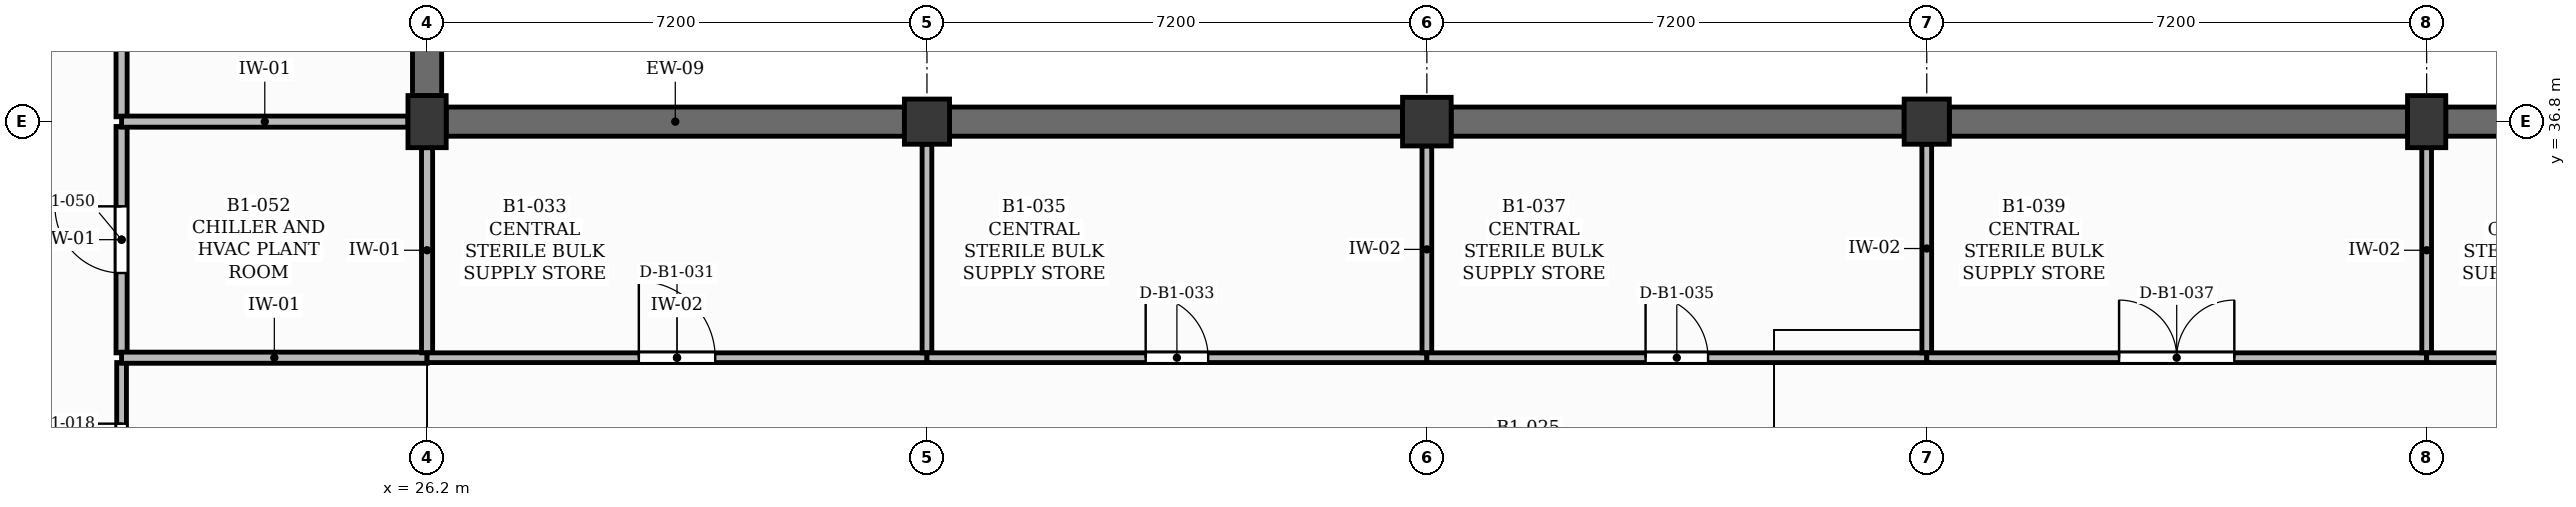
"""IFC4 building model, lengths in metres.
Left out: names, types, materials, properties, quantities, classifications, styles, units other than length and angle.
Written with IfcOpenShell. Run it as: python <this file> out.ifc"""

import sys

from ifc_helpers import new_model, si_unit, direction, frame, frame_2d, origin, origin_2d, place, context, subcontext, project, spatial, rectangle, extrude, element, fill, save


model = new_model("IFC4")
c1 = context("Model", 3, precision=1e-05, world=origin(), true_north=direction((0.0, 1.0)))
c2 = subcontext(c1, "Body", "Model", "MODEL_VIEW")
j1 = project(units=[si_unit("LENGTHUNIT", "METRE"), si_unit("PLANEANGLEUNIT", "RADIAN")], contexts=[c1])
p1 = place(None, origin())
s1 = spatial("IfcSite", under=j1, at=p1, CompositionType="ELEMENT")
p2 = place(p1, origin())
s2 = spatial("IfcBuilding", under=s1, at=p2, CompositionType="ELEMENT")
p3 = place(p2, frame((0.0, 0.0, -4.5)))
s3 = spatial("IfcBuildingStorey", under=s2, at=p3, CompositionType="ELEMENT", Elevation=-4.5)
p4 = place(p3, frame((26.2, 36.8, 0.0), z_axis=(0.0, 0.0, 1.0), x_axis=(1.0, 0.0, 0.0)))
e1 = element("IfcColumn", 1, at=p4, inside=s3, PredefinedType="COLUMN", context=c2, shape_type="SweptSolid", body=[
    extrude(rectangle(XDim=0.55, YDim=0.75, at=origin_2d()), origin(), (0.0, 0.0, 1.0), 4.2),
])
p5 = place(p3, frame((33.4, 36.8, 0.0), z_axis=(0.0, 0.0, 1.0), x_axis=(1.0, 0.0, 0.0)))
e2 = element("IfcColumn", 2, at=p5, inside=s3, PredefinedType="COLUMN", context=c2, shape_type="SweptSolid", body=[
    extrude(rectangle(XDim=0.65, YDim=0.65, at=origin_2d()), origin(), (0.0, 0.0, 1.0), 4.2),
])
p6 = place(p3, frame((40.6, 36.8, 0.0), z_axis=(0.0, 0.0, 1.0), x_axis=(1.0, 0.0, 0.0)))
e3 = element("IfcColumn", 3, at=p6, inside=s3, PredefinedType="COLUMN", context=c2, shape_type="SweptSolid", body=[
    extrude(rectangle(XDim=0.7, YDim=0.7, at=origin_2d()), origin(), (0.0, 0.0, 1.0), 4.2),
])
p7 = place(p3, frame((47.8, 36.8, 0.0), z_axis=(0.0, 0.0, 1.0), x_axis=(1.0, 0.0, 0.0)))
e4 = element("IfcColumn", 4, at=p7, inside=s3, PredefinedType="COLUMN", context=c2, shape_type="SweptSolid", body=[
    extrude(rectangle(XDim=0.65, YDim=0.65, at=origin_2d()), origin(), (0.0, 0.0, 1.0), 4.2),
])
p8 = place(p3, frame((55.0, 36.8, 0.0), z_axis=(0.0, 0.0, 1.0), x_axis=(1.0, 0.0, 0.0)))
e5 = element("IfcColumn", 5, at=p8, inside=s3, PredefinedType="COLUMN", context=c2, shape_type="SweptSolid", body=[
    extrude(rectangle(XDim=0.55, YDim=0.75, at=origin_2d()), origin(), (0.0, 0.0, 1.0), 4.2),
])
p9 = place(p3, frame((26.2, 37.175, 0.0), z_axis=(0.0, 0.0, 1.0), x_axis=(0.0, 1.0, 0.0)))
e6 = element("IfcWall", 6, at=p9, inside=s3, PredefinedType="USERDEFINED", context=c2, shape_type="SweptSolid", body=[
    extrude(rectangle(XDim=7.85, YDim=0.42, at=frame_2d((3.925, 0.0))), origin(), (0.0, 0.0, 1.0), 4.2),
])
p10 = place(p3, frame((26.475, 36.8, 0.0), z_axis=(0.0, 0.0, 1.0), x_axis=(1.0, 0.0, 0.0)))
e7 = element("IfcWall", 7, at=p10, inside=s3, PredefinedType="USERDEFINED", context=c2, shape_type="SweptSolid", body=[
    extrude(rectangle(XDim=6.6, YDim=0.42, at=frame_2d((3.3, 0.0))), origin(), (0.0, 0.0, 1.0), 4.2),
])
p11 = place(p3, frame((33.725, 36.8, 0.0), z_axis=(0.0, 0.0, 1.0), x_axis=(1.0, 0.0, 0.0)))
e8 = element("IfcWall", 8, at=p11, inside=s3, PredefinedType="USERDEFINED", context=c2, shape_type="SweptSolid", body=[
    extrude(rectangle(XDim=6.525, YDim=0.42, at=frame_2d((3.262, 0.0))), origin(), (0.0, 0.0, 1.0), 4.2),
])
p12 = place(p3, frame((40.95, 36.8, 0.0), z_axis=(0.0, 0.0, 1.0), x_axis=(1.0, 0.0, 0.0)))
e9 = element("IfcWall", 9, at=p12, inside=s3, PredefinedType="USERDEFINED", context=c2, shape_type="SweptSolid", body=[
    extrude(rectangle(XDim=6.525, YDim=0.42, at=frame_2d((3.263, 0.0))), origin(), (0.0, 0.0, 1.0), 4.2),
])
p13 = place(p3, frame((48.125, 36.8, 0.0), z_axis=(0.0, 0.0, 1.0), x_axis=(1.0, 0.0, 0.0)))
e10 = element("IfcWall", 10, at=p13, inside=s3, PredefinedType="USERDEFINED", context=c2, shape_type="SweptSolid", body=[
    extrude(rectangle(XDim=6.6, YDim=0.42, at=frame_2d((3.3, 0.0))), origin(), (0.0, 0.0, 1.0), 4.2),
])
p14 = place(p3, frame((55.275, 36.8, 0.0), z_axis=(0.0, 0.0, 1.0), x_axis=(1.0, 0.0, 0.0)))
e11 = element("IfcWall", 11, at=p14, inside=s3, PredefinedType="USERDEFINED", context=c2, shape_type="SweptSolid", body=[
    extrude(rectangle(XDim=6.575, YDim=0.42, at=frame_2d((3.288, 0.0))), origin(), (0.0, 0.0, 1.0), 4.2),
])
p15 = place(p3, frame((21.8, 30.47, 0.0), z_axis=(0.0, 0.0, 1.0), x_axis=(0.0, 1.0, 0.0)))
e12 = element("IfcWall", 12, at=p15, inside=s3, PredefinedType="PARTITIONING", context=c2, shape_type="SweptSolid", body=[
    extrude(rectangle(XDim=2.86, YDim=0.14, at=frame_2d((1.43, 0.0))), origin(), (0.0, 0.0, 1.0), 4.08),
])
p16 = place(p15, frame((0.88, 0.0, 0.0)))
e13 = element("IfcOpeningElement", 13, at=p16, cuts=e12, PredefinedType="OPENING", context=c2, shape_type="SweptSolid", body=[
    extrude(rectangle(XDim=1.1, YDim=2.1, at=frame_2d((0.55, 1.05))), frame((0.0, 0.08, 0.0), z_axis=(0.0, -1.0, 0.0), x_axis=(1.0, 0.0, 0.0)), (0.0, 0.0, 1.0), 0.16),
])
p17 = place(p3, frame((21.8, 33.47, 0.0), z_axis=(0.0, 0.0, 1.0), x_axis=(0.0, 1.0, 0.0)))
e14 = element("IfcWall", 14, at=p17, inside=s3, PredefinedType="PARTITIONING", context=c2, shape_type="SweptSolid", body=[
    extrude(rectangle(XDim=3.26, YDim=0.16, at=frame_2d((1.63, 0.0))), origin(), (0.0, 0.0, 1.0), 4.08),
])
p18 = place(p17, frame((1.15, 0.0, 0.0)))
e15 = element("IfcOpeningElement", 15, at=p18, cuts=e14, PredefinedType="OPENING", context=c2, shape_type="SweptSolid", body=[
    extrude(rectangle(XDim=0.96, YDim=2.1, at=frame_2d((0.48, 1.05))), frame((0.0, 0.09, 0.0), z_axis=(0.0, -1.0, 0.0), x_axis=(1.0, 0.0, 0.0)), (0.0, 0.0, 1.0), 0.18),
])
p19 = place(p3, frame((21.8, 33.4, 0.0), z_axis=(0.0, 0.0, 1.0), x_axis=(1.0, 0.0, 0.0)))
e16 = element("IfcWall", 16, at=p19, inside=s3, PredefinedType="PARTITIONING", context=c2, shape_type="SweptSolid", body=[
    extrude(rectangle(XDim=4.4, YDim=0.16, at=frame_2d((2.2, 0.0))), origin(), (0.0, 0.0, 1.0), 4.08),
])
p20 = place(p3, frame((21.8, 36.87, 0.0), z_axis=(0.0, 0.0, 1.0), x_axis=(0.0, 1.0, 0.0)))
e17 = element("IfcWall", 17, at=p20, inside=s3, PredefinedType="PARTITIONING", context=c2, shape_type="SweptSolid", body=[
    extrude(rectangle(XDim=8.46, YDim=0.16, at=frame_2d((4.23, 0.0))), origin(), (0.0, 0.0, 1.0), 4.08),
])
p21 = place(p20, frame((3.75, 0.0, 0.0)))
e18 = element("IfcOpeningElement", 18, at=p21, cuts=e17, PredefinedType="OPENING", context=c2, shape_type="SweptSolid", body=[
    extrude(rectangle(XDim=0.96, YDim=2.1, at=frame_2d((0.48, 1.05))), frame((0.0, 0.09, 0.0), z_axis=(0.0, -1.0, 0.0), x_axis=(1.0, 0.0, 0.0)), (0.0, 0.0, 1.0), 0.18),
])
p22 = place(p3, frame((21.8, 36.8, 0.0), z_axis=(0.0, 0.0, 1.0), x_axis=(1.0, 0.0, 0.0)))
e19 = element("IfcWall", 19, at=p22, inside=s3, PredefinedType="PARTITIONING", context=c2, shape_type="SweptSolid", body=[
    extrude(rectangle(XDim=4.125, YDim=0.16, at=frame_2d((2.062, 0.0))), origin(), (0.0, 0.0, 1.0), 3.5),
])
p23 = place(p3, frame((26.2, 33.47, 0.0), z_axis=(0.0, 0.0, 1.0), x_axis=(0.0, 1.0, 0.0)))
e20 = element("IfcWall", 20, at=p23, inside=s3, PredefinedType="PARTITIONING", context=c2, shape_type="SweptSolid", body=[
    extrude(rectangle(XDim=2.955, YDim=0.16, at=frame_2d((1.478, 0.0))), origin(), (0.0, 0.0, 1.0), 3.4),
])
p24 = place(p3, frame((26.2, 33.4, 0.0), z_axis=(0.0, 0.0, 1.0), x_axis=(1.0, 0.0, 0.0)))
e21 = element("IfcWall", 21, at=p24, inside=s3, PredefinedType="PARTITIONING", context=c2, shape_type="SweptSolid", body=[
    extrude(rectangle(XDim=7.2, YDim=0.14, at=frame_2d((3.6, 0.0))), origin(), (0.0, 0.0, 1.0), 4.08),
])
p25 = place(p24, frame((3.05, 0.0, 0.0)))
e22 = element("IfcOpeningElement", 22, at=p25, cuts=e21, PredefinedType="OPENING", context=c2, shape_type="SweptSolid", body=[
    extrude(rectangle(XDim=1.1, YDim=2.1, at=frame_2d((0.55, 1.05))), frame((0.0, 0.08, 0.0), z_axis=(0.0, -1.0, 0.0), x_axis=(1.0, 0.0, 0.0)), (0.0, 0.0, 1.0), 0.16),
])
p26 = place(p3, frame((33.4, 33.47, 0.0), z_axis=(0.0, 0.0, 1.0), x_axis=(0.0, 1.0, 0.0)))
e23 = element("IfcWall", 23, at=p26, inside=s3, PredefinedType="PARTITIONING", context=c2, shape_type="SweptSolid", body=[
    extrude(rectangle(XDim=3.005, YDim=0.14, at=frame_2d((1.502, 0.0))), origin(), (0.0, 0.0, 1.0), 3.4),
])
p27 = place(p3, frame((33.4, 33.4, 0.0), z_axis=(0.0, 0.0, 1.0), x_axis=(1.0, 0.0, 0.0)))
e24 = element("IfcWall", 24, at=p27, inside=s3, PredefinedType="PARTITIONING", context=c2, shape_type="SweptSolid", body=[
    extrude(rectangle(XDim=7.2, YDim=0.14, at=frame_2d((3.6, 0.0))), origin(), (0.0, 0.0, 1.0), 4.08),
])
p28 = place(p27, frame((3.15, 0.0, 0.0)))
e25 = element("IfcOpeningElement", 25, at=p28, cuts=e24, PredefinedType="OPENING", context=c2, shape_type="SweptSolid", body=[
    extrude(rectangle(XDim=0.9, YDim=2.1, at=frame_2d((0.45, 1.05))), frame((0.0, 0.08, 0.0), z_axis=(0.0, -1.0, 0.0), x_axis=(1.0, 0.0, 0.0)), (0.0, 0.0, 1.0), 0.16),
])
p29 = place(p3, frame((40.6, 33.47, 0.0), z_axis=(0.0, 0.0, 1.0), x_axis=(0.0, 1.0, 0.0)))
e26 = element("IfcWall", 26, at=p29, inside=s3, PredefinedType="PARTITIONING", context=c2, shape_type="SweptSolid", body=[
    extrude(rectangle(XDim=2.98, YDim=0.14, at=frame_2d((1.49, 0.0))), origin(), (0.0, 0.0, 1.0), 3.4),
])
p30 = place(p3, frame((40.6, 33.4, 0.0), z_axis=(0.0, 0.0, 1.0), x_axis=(1.0, 0.0, 0.0)))
e27 = element("IfcWall", 27, at=p30, inside=s3, PredefinedType="PARTITIONING", context=c2, shape_type="SweptSolid", body=[
    extrude(rectangle(XDim=7.2, YDim=0.14, at=frame_2d((3.6, 0.0))), origin(), (0.0, 0.0, 1.0), 4.08),
])
p31 = place(p30, frame((3.15, 0.0, 0.0)))
e28 = element("IfcOpeningElement", 28, at=p31, cuts=e27, PredefinedType="OPENING", context=c2, shape_type="SweptSolid", body=[
    extrude(rectangle(XDim=0.9, YDim=2.1, at=frame_2d((0.45, 1.05))), frame((0.0, 0.08, 0.0), z_axis=(0.0, -1.0, 0.0), x_axis=(1.0, 0.0, 0.0)), (0.0, 0.0, 1.0), 0.16),
])
p32 = place(p3, frame((47.8, 33.47, 0.0), z_axis=(0.0, 0.0, 1.0), x_axis=(0.0, 1.0, 0.0)))
e29 = element("IfcWall", 29, at=p32, inside=s3, PredefinedType="PARTITIONING", context=c2, shape_type="SweptSolid", body=[
    extrude(rectangle(XDim=3.005, YDim=0.14, at=frame_2d((1.502, 0.0))), origin(), (0.0, 0.0, 1.0), 3.4),
])
p33 = place(p3, frame((47.8, 33.4, 0.0), z_axis=(0.0, 0.0, 1.0), x_axis=(1.0, 0.0, 0.0)))
e30 = element("IfcWall", 30, at=p33, inside=s3, PredefinedType="PARTITIONING", context=c2, shape_type="SweptSolid", body=[
    extrude(rectangle(XDim=7.2, YDim=0.14, at=frame_2d((3.6, 0.0))), origin(), (0.0, 0.0, 1.0), 4.08),
])
p34 = place(p33, frame((2.77, 0.0, 0.0)))
e31 = element("IfcOpeningElement", 31, at=p34, cuts=e30, PredefinedType="OPENING", context=c2, shape_type="SweptSolid", body=[
    extrude(rectangle(XDim=1.66, YDim=2.3, at=frame_2d((0.83, 1.15))), frame((0.0, 0.08, 0.0), z_axis=(0.0, -1.0, 0.0), x_axis=(1.0, 0.0, 0.0)), (0.0, 0.0, 1.0), 0.16),
])
p35 = place(p3, frame((55.0, 33.47, 0.0), z_axis=(0.0, 0.0, 1.0), x_axis=(0.0, 1.0, 0.0)))
e32 = element("IfcWall", 32, at=p35, inside=s3, PredefinedType="PARTITIONING", context=c2, shape_type="SweptSolid", body=[
    extrude(rectangle(XDim=2.955, YDim=0.14, at=frame_2d((1.478, 0.0))), origin(), (0.0, 0.0, 1.0), 3.4),
])
p36 = place(p3, frame((55.0, 33.4, 0.0), z_axis=(0.0, 0.0, 1.0), x_axis=(1.0, 0.0, 0.0)))
e33 = element("IfcWall", 33, at=p36, inside=s3, PredefinedType="PARTITIONING", context=c2, shape_type="SweptSolid", body=[
    extrude(rectangle(XDim=7.05, YDim=0.14, at=frame_2d((3.525, 0.0))), origin(), (0.0, 0.0, 1.0), 4.08),
])
p37 = place(p36, frame((2.885, 0.0, 0.0)))
e34 = element("IfcOpeningElement", 34, at=p37, cuts=e33, PredefinedType="OPENING", context=c2, shape_type="SweptSolid", body=[
    extrude(rectangle(XDim=1.28, YDim=2.2, at=frame_2d((0.64, 1.1))), frame((0.0, 0.08, 0.0), z_axis=(0.0, -1.0, 0.0), x_axis=(1.0, 0.0, 0.0)), (0.0, 0.0, 1.0), 0.16),
])
p38 = place(p16, origin())
e35 = element("IfcDoor", 35, at=p38, inside=s3, OperationType="SINGLE_SWING_RIGHT", PredefinedType="DOOR", context=c2, shape_type="SweptSolid", body=[
    extrude(rectangle(XDim=1.1, YDim=2.1, at=frame_2d((0.55, 1.05))), frame((0.0, 0.025, 0.0), z_axis=(0.0, -1.0, 0.0), x_axis=(1.0, 0.0, 0.0)), (0.0, 0.0, 1.0), 0.05),
])
fill(e13, e35)
p39 = place(p25, origin())
e36 = element("IfcDoor", 36, at=p39, inside=s3, OperationType="SINGLE_SWING_LEFT", PredefinedType="DOOR", context=c2, shape_type="SweptSolid", body=[
    extrude(rectangle(XDim=1.1, YDim=2.1, at=frame_2d((0.55, 1.05))), frame((0.0, 0.025, 0.0), z_axis=(0.0, -1.0, 0.0), x_axis=(1.0, 0.0, 0.0)), (0.0, 0.0, 1.0), 0.05),
])
fill(e22, e36)
p40 = place(p28, origin())
e37 = element("IfcDoor", 37, at=p40, inside=s3, OperationType="SINGLE_SWING_LEFT", PredefinedType="DOOR", context=c2, shape_type="SweptSolid", body=[
    extrude(rectangle(XDim=0.9, YDim=2.1, at=frame_2d((0.45, 1.05))), frame((0.0, 0.025, 0.0), z_axis=(0.0, -1.0, 0.0), x_axis=(1.0, 0.0, 0.0)), (0.0, 0.0, 1.0), 0.05),
])
fill(e25, e37)
p41 = place(p31, origin())
e38 = element("IfcDoor", 38, at=p41, inside=s3, OperationType="SINGLE_SWING_LEFT", PredefinedType="DOOR", context=c2, shape_type="SweptSolid", body=[
    extrude(rectangle(XDim=0.9, YDim=2.1, at=frame_2d((0.45, 1.05))), frame((0.0, 0.025, 0.0), z_axis=(0.0, -1.0, 0.0), x_axis=(1.0, 0.0, 0.0)), (0.0, 0.0, 1.0), 0.05),
])
fill(e28, e38)
p42 = place(p34, origin())
e39 = element("IfcDoor", 39, at=p42, inside=s3, OperationType="DOUBLE_DOOR_SINGLE_SWING", PredefinedType="DOOR", context=c2, shape_type="SweptSolid", body=[
    extrude(rectangle(XDim=1.66, YDim=2.3, at=frame_2d((0.83, 1.15))), frame((0.0, 0.025, 0.0), z_axis=(0.0, -1.0, 0.0), x_axis=(1.0, 0.0, 0.0)), (0.0, 0.0, 1.0), 0.05),
])
fill(e31, e39)
p43 = place(p18, origin())
e40 = element("IfcDoor", 40, at=p43, inside=s3, OperationType="SINGLE_SWING_RIGHT", PredefinedType="DOOR", context=c2, shape_type="SweptSolid", body=[
    extrude(rectangle(XDim=0.96, YDim=2.1, at=frame_2d((0.48, 1.05))), frame((0.0, 0.025, 0.0), z_axis=(0.0, -1.0, 0.0), x_axis=(1.0, 0.0, 0.0)), (0.0, 0.0, 1.0), 0.05),
])
fill(e15, e40)
save(model, sys.argv[1])
